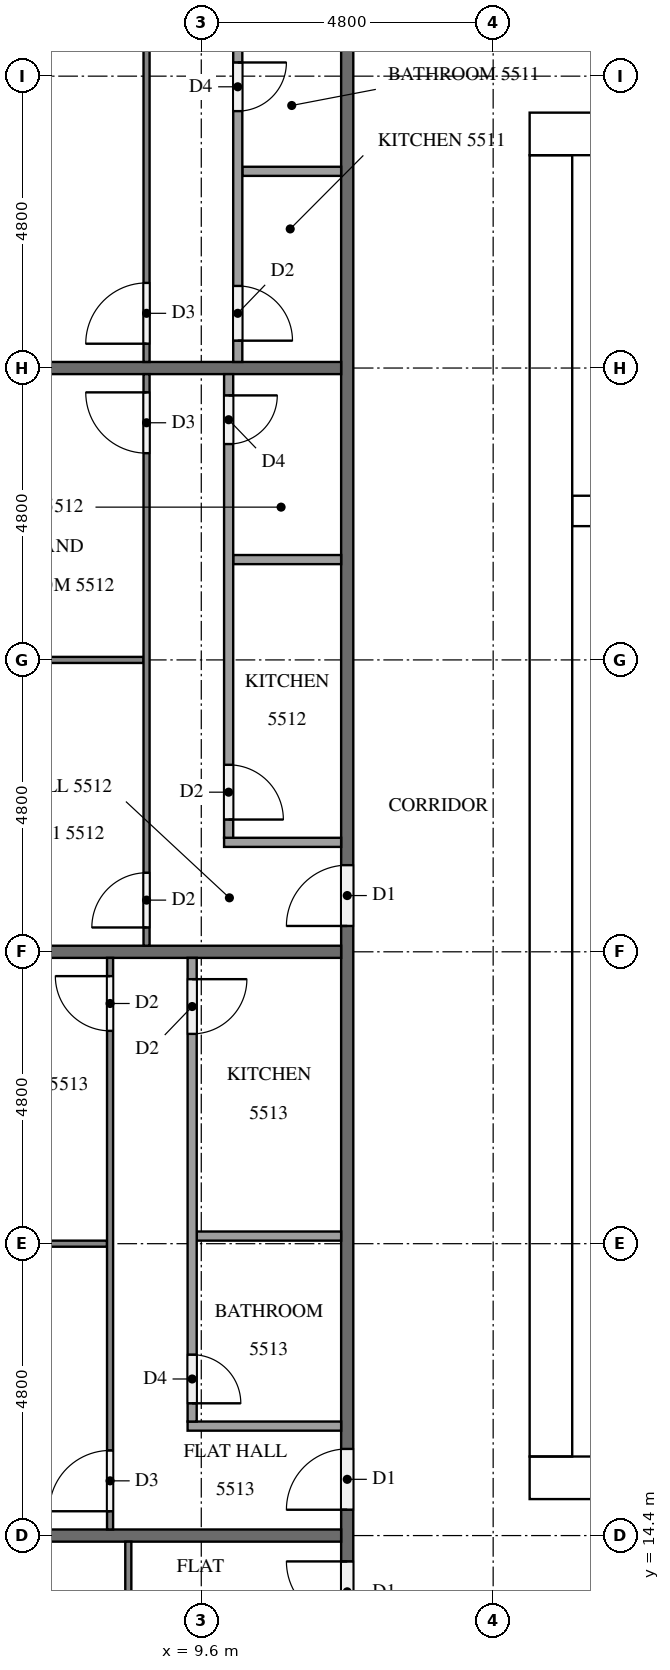
"""IFC4 building model, lengths in metres.
Left out: names, types, materials, properties, quantities, classifications, styles, units other than length and angle.
Written with IfcOpenShell. Run it as: python <this file> out.ifc"""

import sys

from ifc_helpers import new_model, si_unit, direction, frame, frame_2d, origin, place, context, subcontext, project, spatial, rectangle, extrude, element, fill, save


model = new_model("IFC4")
c1 = context("Model", 3, precision=1e-05, world=origin(), true_north=direction((0.0, 1.0)))
c2 = subcontext(c1, "Body", "Model", "MODEL_VIEW")
j1 = project(units=[si_unit("LENGTHUNIT", "METRE"), si_unit("PLANEANGLEUNIT", "RADIAN")], contexts=[c1])
p1 = place(None, origin())
s1 = spatial("IfcSite", under=j1, at=p1, CompositionType="ELEMENT")
p2 = place(p1, origin())
s2 = spatial("IfcBuilding", under=s1, at=p2, CompositionType="ELEMENT")
p3 = place(p2, frame((0.0, 0.0, 212.3)))
s3 = spatial("IfcBuildingStorey", under=s2, at=p3, CompositionType="ELEMENT", Elevation=212.3)
p4 = place(p3, frame((15.0, 15.35, 0.0), z_axis=(0.0, 0.0, 1.0), x_axis=(1.0, 0.0, 0.0)))
e1 = element("IfcWall", 1, at=p4, inside=s3, PredefinedType="SHEAR", context=c2, shape_type="SweptSolid", body=[
    extrude(rectangle(XDim=32.4, YDim=0.7, at=frame_2d((16.2, 0.0))), origin(), (0.0, 0.0, 1.0), 3.2),
])
p5 = place(p4, frame((15.3, 0.0, 0.0)))
e2 = element("IfcOpeningElement", 2, at=p5, cuts=e1, PredefinedType="OPENING", context=c2, shape_type="SweptSolid", body=[
    extrude(rectangle(XDim=1.8, YDim=2.1, at=frame_2d((0.9, 1.05))), frame((0.0, 0.36, 0.0), z_axis=(0.0, -1.0, 0.0), x_axis=(1.0, 0.0, 0.0)), (0.0, 0.0, 1.0), 0.72),
])
p6 = place(p3, frame((15.0, 37.45, 0.0), z_axis=(0.0, 0.0, 1.0), x_axis=(1.0, 0.0, 0.0)))
e3 = element("IfcWall", 3, at=p6, inside=s3, PredefinedType="SHEAR", context=c2, shape_type="SweptSolid", body=[
    extrude(rectangle(XDim=32.4, YDim=0.7, at=frame_2d((16.2, 0.0))), origin(), (0.0, 0.0, 1.0), 3.2),
])
p7 = place(p6, frame((15.3, 0.0, 0.0)))
e4 = element("IfcOpeningElement", 4, at=p7, cuts=e3, PredefinedType="OPENING", context=c2, shape_type="SweptSolid", body=[
    extrude(rectangle(XDim=1.8, YDim=2.1, at=frame_2d((0.9, 1.05))), frame((0.0, 0.36, 0.0), z_axis=(0.0, -1.0, 0.0), x_axis=(1.0, 0.0, 0.0)), (0.0, 0.0, 1.0), 0.72),
])
p8 = place(p6, frame((1.544, 0.0, 0.0)))
e5 = element("IfcOpeningElement", 5, at=p8, cuts=e3, PredefinedType="OPENING", context=c2, shape_type="SweptSolid", body=[
    extrude(rectangle(XDim=1.0, YDim=2.1, at=frame_2d((0.5, 1.05))), frame((0.0, 0.36, 0.0), z_axis=(0.0, -1.0, 0.0), x_axis=(1.0, 0.0, 0.0)), (0.0, 0.0, 1.0), 0.72),
])
p9 = place(p6, frame((5.219, 0.0, 0.0)))
e6 = element("IfcOpeningElement", 6, at=p9, cuts=e3, PredefinedType="OPENING", context=c2, shape_type="SweptSolid", body=[
    extrude(rectangle(XDim=1.0, YDim=2.1, at=frame_2d((0.5, 1.05))), frame((0.0, 0.36, 0.0), z_axis=(0.0, -1.0, 0.0), x_axis=(1.0, 0.0, 0.0)), (0.0, 0.0, 1.0), 0.72),
])
p10 = place(p3, frame((15.35, 15.7, 0.0), z_axis=(0.0, 0.0, 1.0), x_axis=(0.0, 1.0, 0.0)))
e7 = element("IfcWall", 7, at=p10, inside=s3, PredefinedType="SHEAR", context=c2, shape_type="SweptSolid", body=[
    extrude(rectangle(XDim=21.4, YDim=0.7, at=frame_2d((10.7, 0.0))), origin(), (0.0, 0.0, 1.0), 3.2),
])
p11 = place(p10, frame((5.06, 0.0, 0.0)))
e8 = element("IfcOpeningElement", 8, at=p11, cuts=e7, PredefinedType="OPENING", context=c2, shape_type="SweptSolid", body=[
    extrude(rectangle(XDim=1.2, YDim=2.1, at=frame_2d((0.6, 1.05))), frame((0.0, 0.36, 0.0), z_axis=(0.0, -1.0, 0.0), x_axis=(1.0, 0.0, 0.0)), (0.0, 0.0, 1.0), 0.72),
])
p12 = place(p3, frame((15.7, 31.25, 0.0), z_axis=(0.0, 0.0, 1.0), x_axis=(1.0, 0.0, 0.0)))
e9 = element("IfcWall", 9, at=p12, inside=s3, PredefinedType="SHEAR", context=c2, shape_type="SweptSolid", body=[
    extrude(rectangle(XDim=7.15, YDim=0.5, at=frame_2d((3.575, 0.0))), origin(), (0.0, 0.0, 1.0), 3.2),
])
p13 = place(p3, frame((12.0, 12.1, 0.0), z_axis=(0.0, 0.0, 1.0), x_axis=(0.0, 1.0, 0.0)))
e10 = element("IfcWall", 10, at=p13, inside=s3, PredefinedType="PARTITIONING", context=c2, shape_type="SweptSolid", body=[
    extrude(rectangle(XDim=28.6, YDim=0.2, at=frame_2d((14.3, 0.0))), origin(), (0.0, 0.0, 1.0), 3.2),
])
p14 = place(p13, frame((27.275, 0.0, 0.0)))
e11 = element("IfcOpeningElement", 11, at=p14, cuts=e10, PredefinedType="OPENING", context=c2, shape_type="SweptSolid", body=[
    extrude(rectangle(XDim=1.0, YDim=2.1, at=frame_2d((0.5, 1.05))), frame((0.0, 0.11, 0.0), z_axis=(0.0, -1.0, 0.0), x_axis=(1.0, 0.0, 0.0)), (0.0, 0.0, 1.0), 0.22),
])
p15 = place(p13, frame((12.325, 0.0, 0.0)))
e12 = element("IfcOpeningElement", 12, at=p15, cuts=e10, PredefinedType="OPENING", context=c2, shape_type="SweptSolid", body=[
    extrude(rectangle(XDim=1.0, YDim=2.1, at=frame_2d((0.5, 1.05))), frame((0.0, 0.11, 0.0), z_axis=(0.0, -1.0, 0.0), x_axis=(1.0, 0.0, 0.0)), (0.0, 0.0, 1.0), 0.22),
])
p16 = place(p13, frame((2.725, 0.0, 0.0)))
e13 = element("IfcOpeningElement", 13, at=p16, cuts=e10, PredefinedType="OPENING", context=c2, shape_type="SweptSolid", body=[
    extrude(rectangle(XDim=1.0, YDim=2.1, at=frame_2d((0.5, 1.05))), frame((0.0, 0.11, 0.0), z_axis=(0.0, -1.0, 0.0), x_axis=(1.0, 0.0, 0.0)), (0.0, 0.0, 1.0), 0.22),
])
p17 = place(p13, frame((0.875, 0.0, 0.0)))
e14 = element("IfcOpeningElement", 14, at=p17, cuts=e10, PredefinedType="OPENING", context=c2, shape_type="SweptSolid", body=[
    extrude(rectangle(XDim=1.0, YDim=2.1, at=frame_2d((0.5, 1.05))), frame((0.0, 0.11, 0.0), z_axis=(0.0, -1.0, 0.0), x_axis=(1.0, 0.0, 0.0)), (0.0, 0.0, 1.0), 0.22),
])
for number, where, z_axis, x_axis in (
    (15, (4.9, 33.6, 0.0), (0.0, 0.0, 1.0), (1.0, 0.0, 0.0)),
    (16, (4.9, 24.0, 0.0), (0.0, 0.0, 1.0), (1.0, 0.0, 0.0)),
    (17, (4.9, 14.4, 0.0), (0.0, 0.0, 1.0), (1.0, 0.0, 0.0)),
):
    element("IfcWall", number, at=place(p3, frame(where, z_axis=z_axis, x_axis=x_axis)), inside=s3, PredefinedType="PARTITIONING", context=c2, shape_type="SweptSolid", body=[
        extrude(rectangle(XDim=7.0, YDim=0.2, at=frame_2d((3.5, 0.0))), origin(), (0.0, 0.0, 1.0), 3.2),
    ])
p18 = place(p3, frame((8.7, 33.7, 0.0), z_axis=(0.0, 0.0, 1.0), x_axis=(0.0, 1.0, 0.0)))
e18 = element("IfcWall", 18, at=p18, inside=s3, PredefinedType="PARTITIONING", context=c2, shape_type="SweptSolid", body=[
    extrude(rectangle(XDim=7.0, YDim=0.1, at=frame_2d((3.5, 0.0))), origin(), (0.0, 0.0, 1.0), 3.2),
])
p19 = place(p18, frame((0.3, 0.0, 0.0)))
e19 = element("IfcOpeningElement", 19, at=p19, cuts=e18, PredefinedType="OPENING", context=c2, shape_type="SweptSolid", body=[
    extrude(rectangle(XDim=1.0, YDim=2.1, at=frame_2d((0.5, 1.05))), frame((0.0, 0.06, 0.0), z_axis=(0.0, -1.0, 0.0), x_axis=(1.0, 0.0, 0.0)), (0.0, 0.0, 1.0), 0.12),
])
p20 = place(p3, frame((11.9, 36.835, 0.0), z_axis=(0.0, 0.0, 1.0), x_axis=(-1.0, 0.0, 0.0)))
e20 = element("IfcWall", 20, at=p20, inside=s3, PredefinedType="PARTITIONING", context=c2, shape_type="SweptSolid", body=[
    extrude(rectangle(XDim=1.625, YDim=0.15, at=frame_2d((0.812, 0.0))), origin(), (0.0, 0.0, 1.0), 3.2),
])
p21 = place(p3, frame((10.2, 38.925, 0.0), z_axis=(0.0, 0.0, 1.0), x_axis=(0.0, -1.0, 0.0)))
e21 = element("IfcWall", 21, at=p21, inside=s3, PredefinedType="PARTITIONING", context=c2, shape_type="SweptSolid", body=[
    extrude(rectangle(XDim=5.225, YDim=0.15, at=frame_2d((2.613, 0.0))), origin(), (0.0, 0.0, 1.0), 3.2),
])
p22 = place(p21, frame((0.3, 0.0, 0.0)))
e22 = element("IfcOpeningElement", 22, at=p22, cuts=e21, PredefinedType="OPENING", context=c2, shape_type="SweptSolid", body=[
    extrude(rectangle(XDim=0.8, YDim=2.1, at=frame_2d((0.4, 1.05))), frame((0.0, 0.085, 0.0), z_axis=(0.0, -1.0, 0.0), x_axis=(1.0, 0.0, 0.0)), (0.0, 0.0, 1.0), 0.17),
])
p23 = place(p21, frame((3.975, 0.0, 0.0)))
e23 = element("IfcOpeningElement", 23, at=p23, cuts=e21, PredefinedType="OPENING", context=c2, shape_type="SweptSolid", body=[
    extrude(rectangle(XDim=0.9, YDim=2.1, at=frame_2d((0.45, 1.05))), frame((0.0, 0.085, 0.0), z_axis=(0.0, -1.0, 0.0), x_axis=(1.0, 0.0, 0.0)), (0.0, 0.0, 1.0), 0.17),
])
p24 = place(p3, frame((8.65, 28.8, 0.0), z_axis=(0.0, 0.0, 1.0), x_axis=(-1.0, 0.0, 0.0)))
e24 = element("IfcWall", 24, at=p24, inside=s3, PredefinedType="PARTITIONING", context=c2, shape_type="SweptSolid", body=[
    extrude(rectangle(XDim=3.525, YDim=0.1, at=frame_2d((1.762, 0.0))), origin(), (0.0, 0.0, 1.0), 3.2),
])
p25 = place(p3, frame((8.7, 24.1, 0.0), z_axis=(0.0, 0.0, 1.0), x_axis=(0.0, 1.0, 0.0)))
e25 = element("IfcWall", 25, at=p25, inside=s3, PredefinedType="PARTITIONING", context=c2, shape_type="SweptSolid", body=[
    extrude(rectangle(XDim=9.4, YDim=0.1, at=frame_2d((4.7, 0.0))), origin(), (0.0, 0.0, 1.0), 3.2),
])
p26 = place(p25, frame((0.3, 0.0, 0.0)))
e26 = element("IfcOpeningElement", 26, at=p26, cuts=e25, PredefinedType="OPENING", context=c2, shape_type="SweptSolid", body=[
    extrude(rectangle(XDim=0.9, YDim=2.1, at=frame_2d((0.45, 1.05))), frame((0.0, 0.06, 0.0), z_axis=(0.0, -1.0, 0.0), x_axis=(1.0, 0.0, 0.0)), (0.0, 0.0, 1.0), 0.12),
])
p27 = place(p25, frame((8.1, 0.0, 0.0)))
e27 = element("IfcOpeningElement", 27, at=p27, cuts=e25, PredefinedType="OPENING", context=c2, shape_type="SweptSolid", body=[
    extrude(rectangle(XDim=1.0, YDim=2.1, at=frame_2d((0.5, 1.05))), frame((0.0, 0.06, 0.0), z_axis=(0.0, -1.0, 0.0), x_axis=(1.0, 0.0, 0.0)), (0.0, 0.0, 1.0), 0.12),
])
p28 = place(p3, frame((11.9, 30.45, 0.0), z_axis=(0.0, 0.0, 1.0), x_axis=(-1.0, 0.0, 0.0)))
e28 = element("IfcWall", 28, at=p28, inside=s3, PredefinedType="PARTITIONING", context=c2, shape_type="SweptSolid", body=[
    extrude(rectangle(XDim=1.775, YDim=0.15, at=frame_2d((0.887, 0.0))), origin(), (0.0, 0.0, 1.0), 3.2),
])
p29 = place(p3, frame((11.9, 25.8, 0.0), z_axis=(0.0, 0.0, 1.0), x_axis=(-1.0, 0.0, 0.0)))
e29 = element("IfcWall", 29, at=p29, inside=s3, PredefinedType="PARTITIONING", context=c2, shape_type="SweptSolid", body=[
    extrude(rectangle(XDim=1.925, YDim=0.15, at=frame_2d((0.962, 0.0))), origin(), (0.0, 0.0, 1.0), 3.2),
])
p30 = place(p3, frame((10.05, 33.5, 0.0), z_axis=(0.0, 0.0, 1.0), x_axis=(0.0, -1.0, 0.0)))
e30 = element("IfcWall", 30, at=p30, inside=s3, PredefinedType="PARTITIONING", context=c2, shape_type="SweptSolid", body=[
    extrude(rectangle(XDim=7.625, YDim=0.15, at=frame_2d((3.812, 0.0))), origin(), (0.0, 0.0, 1.0), 3.2),
])
p31 = place(p30, frame((6.425, 0.0, 0.0)))
e31 = element("IfcOpeningElement", 31, at=p31, cuts=e30, PredefinedType="OPENING", context=c2, shape_type="SweptSolid", body=[
    extrude(rectangle(XDim=0.9, YDim=2.1, at=frame_2d((0.45, 1.05))), frame((0.0, 0.085, 0.0), z_axis=(0.0, -1.0, 0.0), x_axis=(1.0, 0.0, 0.0)), (0.0, 0.0, 1.0), 0.17),
])
p32 = place(p30, frame((0.35, 0.0, 0.0)))
e32 = element("IfcOpeningElement", 32, at=p32, cuts=e30, PredefinedType="OPENING", context=c2, shape_type="SweptSolid", body=[
    extrude(rectangle(XDim=0.8, YDim=2.1, at=frame_2d((0.4, 1.05))), frame((0.0, 0.085, 0.0), z_axis=(0.0, -1.0, 0.0), x_axis=(1.0, 0.0, 0.0)), (0.0, 0.0, 1.0), 0.17),
])
p33 = place(p3, frame((8.05, 19.2, 0.0), z_axis=(0.0, 0.0, 1.0), x_axis=(-1.0, 0.0, 0.0)))
e33 = element("IfcWall", 33, at=p33, inside=s3, PredefinedType="PARTITIONING", context=c2, shape_type="SweptSolid", body=[
    extrude(rectangle(XDim=2.925, YDim=0.1, at=frame_2d((1.462, 0.0))), origin(), (0.0, 0.0, 1.0), 3.2),
])
p34 = place(p3, frame((8.1, 14.5, 0.0), z_axis=(0.0, 0.0, 1.0), x_axis=(0.0, 1.0, 0.0)))
e34 = element("IfcWall", 34, at=p34, inside=s3, PredefinedType="PARTITIONING", context=c2, shape_type="SweptSolid", body=[
    extrude(rectangle(XDim=9.4, YDim=0.1, at=frame_2d((4.7, 0.0))), origin(), (0.0, 0.0, 1.0), 3.2),
])
p35 = place(p34, frame((0.3, 0.0, 0.0)))
e35 = element("IfcOpeningElement", 35, at=p35, cuts=e34, PredefinedType="OPENING", context=c2, shape_type="SweptSolid", body=[
    extrude(rectangle(XDim=1.0, YDim=2.1, at=frame_2d((0.5, 1.05))), frame((0.0, 0.06, 0.0), z_axis=(0.0, -1.0, 0.0), x_axis=(1.0, 0.0, 0.0)), (0.0, 0.0, 1.0), 0.12),
])
p36 = place(p34, frame((8.2, 0.0, 0.0)))
e36 = element("IfcOpeningElement", 36, at=p36, cuts=e34, PredefinedType="OPENING", context=c2, shape_type="SweptSolid", body=[
    extrude(rectangle(XDim=0.9, YDim=2.1, at=frame_2d((0.45, 1.05))), frame((0.0, 0.06, 0.0), z_axis=(0.0, -1.0, 0.0), x_axis=(1.0, 0.0, 0.0)), (0.0, 0.0, 1.0), 0.12),
])
p37 = place(p3, frame((11.9, 19.325, 0.0), z_axis=(0.0, 0.0, 1.0), x_axis=(-1.0, 0.0, 0.0)))
e37 = element("IfcWall", 37, at=p37, inside=s3, PredefinedType="PARTITIONING", context=c2, shape_type="SweptSolid", body=[
    extrude(rectangle(XDim=2.375, YDim=0.15, at=frame_2d((1.188, 0.0))), origin(), (0.0, 0.0, 1.0), 3.2),
])
p38 = place(p3, frame((11.9, 16.2, 0.0), z_axis=(0.0, 0.0, 1.0), x_axis=(-1.0, 0.0, 0.0)))
e38 = element("IfcWall", 38, at=p38, inside=s3, PredefinedType="PARTITIONING", context=c2, shape_type="SweptSolid", body=[
    extrude(rectangle(XDim=2.525, YDim=0.15, at=frame_2d((1.262, 0.0))), origin(), (0.0, 0.0, 1.0), 3.2),
])
p39 = place(p3, frame((9.45, 23.9, 0.0), z_axis=(0.0, 0.0, 1.0), x_axis=(0.0, -1.0, 0.0)))
e39 = element("IfcWall", 39, at=p39, inside=s3, PredefinedType="PARTITIONING", context=c2, shape_type="SweptSolid", body=[
    extrude(rectangle(XDim=7.625, YDim=0.15, at=frame_2d((3.812, 0.0))), origin(), (0.0, 0.0, 1.0), 3.2),
])
p40 = place(p39, frame((6.525, 0.0, 0.0)))
e40 = element("IfcOpeningElement", 40, at=p40, cuts=e39, PredefinedType="OPENING", context=c2, shape_type="SweptSolid", body=[
    extrude(rectangle(XDim=0.8, YDim=2.1, at=frame_2d((0.4, 1.05))), frame((0.0, 0.085, 0.0), z_axis=(0.0, -1.0, 0.0), x_axis=(1.0, 0.0, 0.0)), (0.0, 0.0, 1.0), 0.17),
])
p41 = place(p39, frame((0.35, 0.0, 0.0)))
e41 = element("IfcOpeningElement", 41, at=p41, cuts=e39, PredefinedType="OPENING", context=c2, shape_type="SweptSolid", body=[
    extrude(rectangle(XDim=0.9, YDim=2.1, at=frame_2d((0.45, 1.05))), frame((0.0, 0.085, 0.0), z_axis=(0.0, -1.0, 0.0), x_axis=(1.0, 0.0, 0.0)), (0.0, 0.0, 1.0), 0.17),
])
p42 = place(p3, frame((8.4, 5.221, 0.0), z_axis=(0.0, 0.0, 1.0), x_axis=(0.0, 1.0, 0.0)))
e42 = element("IfcWall", 42, at=p42, inside=s3, PredefinedType="PARTITIONING", context=c2, shape_type="SweptSolid", body=[
    extrude(rectangle(XDim=9.079, YDim=0.1, at=frame_2d((4.539, 0.0))), origin(), (0.0, 0.0, 1.0), 3.2),
])
p43 = place(p42, frame((4.729, 0.0, 0.0)))
e43 = element("IfcOpeningElement", 43, at=p43, cuts=e42, PredefinedType="OPENING", context=c2, shape_type="SweptSolid", body=[
    extrude(rectangle(XDim=0.9, YDim=2.1, at=frame_2d((0.45, 1.05))), frame((0.0, 0.06, 0.0), z_axis=(0.0, -1.0, 0.0), x_axis=(1.0, 0.0, 0.0)), (0.0, 0.0, 1.0), 0.12),
])
p44 = place(p42, frame((3.029, 0.0, 0.0)))
e44 = element("IfcOpeningElement", 44, at=p44, cuts=e42, PredefinedType="OPENING", context=c2, shape_type="SweptSolid", body=[
    extrude(rectangle(XDim=1.0, YDim=2.1, at=frame_2d((0.5, 1.05))), frame((0.0, 0.06, 0.0), z_axis=(0.0, -1.0, 0.0), x_axis=(1.0, 0.0, 0.0)), (0.0, 0.0, 1.0), 0.12),
])
p45 = place(p11, frame((1.2, 0.0, 0.0), z_axis=(0.0, 0.0, 1.0), x_axis=(-1.0, 0.0, 0.0)))
e45 = element("IfcDoor", 45, at=p45, inside=s3, OperationType="SINGLE_SWING_RIGHT", PredefinedType="DOOR", context=c2, shape_type="SweptSolid", body=[
    extrude(rectangle(XDim=1.2, YDim=2.1, at=frame_2d((0.6, 1.05))), frame((0.0, 0.025, 0.0), z_axis=(0.0, -1.0, 0.0), x_axis=(1.0, 0.0, 0.0)), (0.0, 0.0, 1.0), 0.05),
])
fill(e8, e45)
p46 = place(p15, origin())
e46 = element("IfcDoor", 46, at=p46, inside=s3, OperationType="SINGLE_SWING_LEFT", PredefinedType="DOOR", context=c2, shape_type="SweptSolid", body=[
    extrude(rectangle(XDim=1.0, YDim=2.1, at=frame_2d((0.5, 1.05))), frame((0.0, 0.025, 0.0), z_axis=(0.0, -1.0, 0.0), x_axis=(1.0, 0.0, 0.0)), (0.0, 0.0, 1.0), 0.05),
])
fill(e12, e46)
p47 = place(p16, origin())
e47 = element("IfcDoor", 47, at=p47, inside=s3, OperationType="SINGLE_SWING_LEFT", PredefinedType="DOOR", context=c2, shape_type="SweptSolid", body=[
    extrude(rectangle(XDim=1.0, YDim=2.1, at=frame_2d((0.5, 1.05))), frame((0.0, 0.025, 0.0), z_axis=(0.0, -1.0, 0.0), x_axis=(1.0, 0.0, 0.0)), (0.0, 0.0, 1.0), 0.05),
])
fill(e13, e47)
p48 = place(p17, origin())
e48 = element("IfcDoor", 48, at=p48, inside=s3, OperationType="SINGLE_SWING_RIGHT", PredefinedType="DOOR", context=c2, shape_type="SweptSolid", body=[
    extrude(rectangle(XDim=1.0, YDim=2.1, at=frame_2d((0.5, 1.05))), frame((0.0, 0.025, 0.0), z_axis=(0.0, -1.0, 0.0), x_axis=(1.0, 0.0, 0.0)), (0.0, 0.0, 1.0), 0.05),
])
fill(e14, e48)
p49 = place(p19, origin())
e49 = element("IfcDoor", 49, at=p49, inside=s3, OperationType="SINGLE_SWING_LEFT", PredefinedType="DOOR", context=c2, shape_type="SweptSolid", body=[
    extrude(rectangle(XDim=1.0, YDim=2.1, at=frame_2d((0.5, 1.05))), frame((0.0, 0.025, 0.0), z_axis=(0.0, -1.0, 0.0), x_axis=(1.0, 0.0, 0.0)), (0.0, 0.0, 1.0), 0.05),
])
fill(e19, e49)
p50 = place(p22, origin())
e50 = element("IfcDoor", 50, at=p50, inside=s3, OperationType="SINGLE_SWING_LEFT", PredefinedType="DOOR", context=c2, shape_type="SweptSolid", body=[
    extrude(rectangle(XDim=0.8, YDim=2.1, at=frame_2d((0.4, 1.05))), frame((0.0, 0.025, 0.0), z_axis=(0.0, -1.0, 0.0), x_axis=(1.0, 0.0, 0.0)), (0.0, 0.0, 1.0), 0.05),
])
fill(e22, e50)
p51 = place(p23, origin())
e51 = element("IfcDoor", 51, at=p51, inside=s3, OperationType="SINGLE_SWING_RIGHT", PredefinedType="DOOR", context=c2, shape_type="SweptSolid", body=[
    extrude(rectangle(XDim=0.9, YDim=2.1, at=frame_2d((0.45, 1.05))), frame((0.0, 0.025, 0.0), z_axis=(0.0, -1.0, 0.0), x_axis=(1.0, 0.0, 0.0)), (0.0, 0.0, 1.0), 0.05),
])
fill(e23, e51)
p52 = place(p26, origin())
e52 = element("IfcDoor", 52, at=p52, inside=s3, OperationType="SINGLE_SWING_LEFT", PredefinedType="DOOR", context=c2, shape_type="SweptSolid", body=[
    extrude(rectangle(XDim=0.9, YDim=2.1, at=frame_2d((0.45, 1.05))), frame((0.0, 0.025, 0.0), z_axis=(0.0, -1.0, 0.0), x_axis=(1.0, 0.0, 0.0)), (0.0, 0.0, 1.0), 0.05),
])
fill(e26, e52)
p53 = place(p27, origin())
e53 = element("IfcDoor", 53, at=p53, inside=s3, OperationType="SINGLE_SWING_RIGHT", PredefinedType="DOOR", context=c2, shape_type="SweptSolid", body=[
    extrude(rectangle(XDim=1.0, YDim=2.1, at=frame_2d((0.5, 1.05))), frame((0.0, 0.025, 0.0), z_axis=(0.0, -1.0, 0.0), x_axis=(1.0, 0.0, 0.0)), (0.0, 0.0, 1.0), 0.05),
])
fill(e27, e53)
p54 = place(p31, origin())
e54 = element("IfcDoor", 54, at=p54, inside=s3, OperationType="SINGLE_SWING_RIGHT", PredefinedType="DOOR", context=c2, shape_type="SweptSolid", body=[
    extrude(rectangle(XDim=0.9, YDim=2.1, at=frame_2d((0.45, 1.05))), frame((0.0, 0.025, 0.0), z_axis=(0.0, -1.0, 0.0), x_axis=(1.0, 0.0, 0.0)), (0.0, 0.0, 1.0), 0.05),
])
fill(e31, e54)
p55 = place(p32, origin())
e55 = element("IfcDoor", 55, at=p55, inside=s3, OperationType="SINGLE_SWING_LEFT", PredefinedType="DOOR", context=c2, shape_type="SweptSolid", body=[
    extrude(rectangle(XDim=0.8, YDim=2.1, at=frame_2d((0.4, 1.05))), frame((0.0, 0.025, 0.0), z_axis=(0.0, -1.0, 0.0), x_axis=(1.0, 0.0, 0.0)), (0.0, 0.0, 1.0), 0.05),
])
fill(e32, e55)
p56 = place(p35, origin())
e56 = element("IfcDoor", 56, at=p56, inside=s3, OperationType="SINGLE_SWING_LEFT", PredefinedType="DOOR", context=c2, shape_type="SweptSolid", body=[
    extrude(rectangle(XDim=1.0, YDim=2.1, at=frame_2d((0.5, 1.05))), frame((0.0, 0.025, 0.0), z_axis=(0.0, -1.0, 0.0), x_axis=(1.0, 0.0, 0.0)), (0.0, 0.0, 1.0), 0.05),
])
fill(e35, e56)
p57 = place(p36, origin())
e57 = element("IfcDoor", 57, at=p57, inside=s3, OperationType="SINGLE_SWING_RIGHT", PredefinedType="DOOR", context=c2, shape_type="SweptSolid", body=[
    extrude(rectangle(XDim=0.9, YDim=2.1, at=frame_2d((0.45, 1.05))), frame((0.0, 0.025, 0.0), z_axis=(0.0, -1.0, 0.0), x_axis=(1.0, 0.0, 0.0)), (0.0, 0.0, 1.0), 0.05),
])
fill(e36, e57)
p58 = place(p40, origin())
e58 = element("IfcDoor", 58, at=p58, inside=s3, OperationType="SINGLE_SWING_RIGHT", PredefinedType="DOOR", context=c2, shape_type="SweptSolid", body=[
    extrude(rectangle(XDim=0.8, YDim=2.1, at=frame_2d((0.4, 1.05))), frame((0.0, 0.025, 0.0), z_axis=(0.0, -1.0, 0.0), x_axis=(1.0, 0.0, 0.0)), (0.0, 0.0, 1.0), 0.05),
])
fill(e40, e58)
p59 = place(p41, origin())
e59 = element("IfcDoor", 59, at=p59, inside=s3, OperationType="SINGLE_SWING_LEFT", PredefinedType="DOOR", context=c2, shape_type="SweptSolid", body=[
    extrude(rectangle(XDim=0.9, YDim=2.1, at=frame_2d((0.45, 1.05))), frame((0.0, 0.025, 0.0), z_axis=(0.0, -1.0, 0.0), x_axis=(1.0, 0.0, 0.0)), (0.0, 0.0, 1.0), 0.05),
])
fill(e41, e59)
save(model, sys.argv[1])
